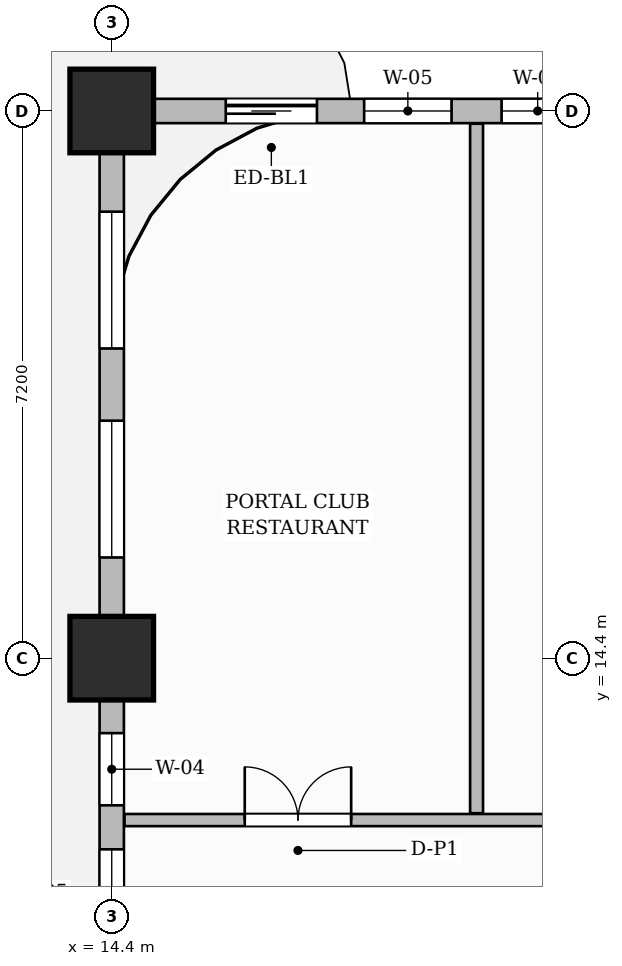
"""IFC4 building model, lengths in metres.
Left out: names, types, materials, properties, quantities, classifications, styles, units other than length and angle.
Written with IfcOpenShell. Run it as: python <this file> out.ifc"""

import sys

from ifc_helpers import new_model, si_unit, direction, frame, frame_2d, origin, origin_2d, place, context, subcontext, project, spatial, rectangle, extrude, source, transform, mapped, element, fill, save


model = new_model("IFC4")
c1 = context("Model", 3, precision=1e-05, world=origin(), true_north=direction((0.0, 1.0)))
c2 = subcontext(c1, "Body", "Model", "MODEL_VIEW")
j1 = project(units=[si_unit("LENGTHUNIT", "METRE"), si_unit("PLANEANGLEUNIT", "RADIAN")], contexts=[c1])
p1 = place(None, origin())
s1 = spatial("IfcSite", under=j1, at=p1, CompositionType="ELEMENT")
p2 = place(p1, origin())
s2 = spatial("IfcBuilding", under=s1, at=p2, CompositionType="ELEMENT")
p3 = place(p2, frame((0.0, 0.0, 54.6)))
s3 = spatial("IfcBuildingStorey", under=s2, at=p3, CompositionType="ELEMENT", Elevation=54.6)
m1 = source(origin(), c2, "Body", "SweptSolid", [
    extrude(rectangle(XDim=1.1, YDim=1.1, at=origin_2d()), origin(), (0.0, 0.0, 1.0), 3.7),
])
for number, where, z_axis, x_axis in (
    (1, (14.4, 14.4, 0.0), (0.0, 0.0, 1.0), (1.0, 0.0, 0.0)),
    (2, (14.4, 21.6, 0.0), (0.0, 0.0, 1.0), (1.0, 0.0, 0.0)),
):
    element("IfcColumn", number, at=place(p3, frame(where, z_axis=z_axis, x_axis=x_axis)), inside=s3, PredefinedType="COLUMN", context=c2, shape_type="MappedRepresentation", body=[
        mapped(m1, transform((0.0, 0.0, 0.0), scale=1.0)),
    ])
p4 = place(p3, frame((14.568, 12.27, 0.0), z_axis=(0.0, 0.0, 1.0), x_axis=(1.0, 0.0, 0.0)))
e3 = element("IfcWall", 3, at=p4, inside=s3, PredefinedType="PARTITIONING", context=c2, shape_type="SweptSolid", body=[
    extrude(rectangle(XDim=15.542, YDim=0.16, at=frame_2d((7.771, 0.0))), origin(), (0.0, 0.0, 1.0), 3.45),
])
p5 = place(p4, frame((1.582, 0.0, 0.0)))
e4 = element("IfcOpeningElement", 4, at=p5, cuts=e3, PredefinedType="OPENING", context=c2, shape_type="SweptSolid", body=[
    extrude(rectangle(XDim=1.4, YDim=2.35, at=frame_2d((0.7, 1.175))), frame((0.0, 0.09, 0.0), z_axis=(0.0, -1.0, 0.0), x_axis=(1.0, 0.0, 0.0)), (0.0, 0.0, 1.0), 0.18),
])
p6 = place(p4, frame((5.757, 0.0, 0.0)))
e5 = element("IfcOpeningElement", 5, at=p6, cuts=e3, PredefinedType="OPENING", context=c2, shape_type="SweptSolid", body=[
    extrude(rectangle(XDim=1.0, YDim=2.2, at=frame_2d((0.5, 1.1))), frame((0.0, 0.09, 0.0), z_axis=(0.0, -1.0, 0.0), x_axis=(1.0, 0.0, 0.0)), (0.0, 0.0, 1.0), 0.18),
])
p7 = place(p4, frame((13.582, 0.0, 0.0)))
e6 = element("IfcOpeningElement", 6, at=p7, cuts=e3, PredefinedType="OPENING", context=c2, shape_type="SweptSolid", body=[
    extrude(rectangle(XDim=1.05, YDim=2.25, at=frame_2d((0.525, 1.125))), frame((0.0, 0.09, 0.0), z_axis=(0.0, -1.0, 0.0), x_axis=(1.0, 0.0, 0.0)), (0.0, 0.0, 1.0), 0.18),
])
p8 = place(p3, frame((19.2, 12.36, 0.0), z_axis=(0.0, 0.0, 1.0), x_axis=(0.0, 1.0, 0.0)))
e7 = element("IfcWall", 7, at=p8, inside=s3, PredefinedType="PARTITIONING", context=c2, shape_type="SweptSolid", body=[
    extrude(rectangle(XDim=9.072, YDim=0.17, at=frame_2d((4.536, 0.0))), origin(), (0.0, 0.0, 1.0), 3.45),
])
p9 = place(p3, frame((14.4, 21.6, 0.0), z_axis=(0.0, 0.0, 1.0), x_axis=(1.0, 0.0, 0.0)))
e8 = element("IfcWall", 8, at=p9, inside=s3, PredefinedType="SOLIDWALL", context=c2, shape_type="SweptSolid", body=[
    extrude(rectangle(XDim=43.2, YDim=0.32, at=frame_2d((21.6, 0.0))), origin(), (0.0, 0.0, 1.0), 2.885),
])
p10 = place(p9, frame((1.5, 0.0, 0.0)))
e9 = element("IfcOpeningElement", 9, at=p10, cuts=e8, PredefinedType="OPENING", context=c2, shape_type="SweptSolid", body=[
    extrude(rectangle(XDim=1.2, YDim=2.2, at=frame_2d((0.6, 1.1))), frame((0.0, 0.17, 0.0), z_axis=(0.0, -1.0, 0.0), x_axis=(1.0, 0.0, 0.0)), (0.0, 0.0, 1.0), 0.34),
])
p11 = place(p9, frame((3.321, 0.0, 0.8)))
e10 = element("IfcOpeningElement", 10, at=p11, cuts=e8, PredefinedType="OPENING", context=c2, shape_type="SweptSolid", body=[
    extrude(rectangle(XDim=1.15, YDim=1.8, at=frame_2d((0.575, 0.9))), frame((0.0, 0.17, 0.0), z_axis=(0.0, -1.0, 0.0), x_axis=(1.0, 0.0, 0.0)), (0.0, 0.0, 1.0), 0.34),
])
p12 = place(p9, frame((5.129, 0.0, 0.8)))
e11 = element("IfcOpeningElement", 11, at=p12, cuts=e8, PredefinedType="OPENING", context=c2, shape_type="SweptSolid", body=[
    extrude(rectangle(XDim=0.95, YDim=1.75, at=frame_2d((0.475, 0.875))), frame((0.0, 0.17, 0.0), z_axis=(0.0, -1.0, 0.0), x_axis=(1.0, 0.0, 0.0)), (0.0, 0.0, 1.0), 0.34),
])
p13 = place(p9, frame((8.496, 0.0, 0.8)))
e12 = element("IfcOpeningElement", 12, at=p13, cuts=e8, PredefinedType="OPENING", context=c2, shape_type="SweptSolid", body=[
    extrude(rectangle(XDim=1.4, YDim=1.85, at=frame_2d((0.7, 0.925))), frame((0.0, 0.17, 0.0), z_axis=(0.0, -1.0, 0.0), x_axis=(1.0, 0.0, 0.0)), (0.0, 0.0, 1.0), 0.34),
])
p14 = place(p9, frame((11.104, 0.0, 0.8)))
e13 = element("IfcOpeningElement", 13, at=p14, cuts=e8, PredefinedType="OPENING", context=c2, shape_type="SweptSolid", body=[
    extrude(rectangle(XDim=1.8, YDim=1.85, at=frame_2d((0.9, 0.925))), frame((0.0, 0.17, 0.0), z_axis=(0.0, -1.0, 0.0), x_axis=(1.0, 0.0, 0.0)), (0.0, 0.0, 1.0), 0.34),
])
p15 = place(p9, frame((16.701, 0.0, 0.8)))
e14 = element("IfcOpeningElement", 14, at=p15, cuts=e8, PredefinedType="OPENING", context=c2, shape_type="SweptSolid", body=[
    extrude(rectangle(XDim=1.8, YDim=1.85, at=frame_2d((0.9, 0.925))), frame((0.0, 0.17, 0.0), z_axis=(0.0, -1.0, 0.0), x_axis=(1.0, 0.0, 0.0)), (0.0, 0.0, 1.0), 0.34),
])
p16 = place(p9, frame((21.725, 0.0, 0.8)))
e15 = element("IfcOpeningElement", 15, at=p16, cuts=e8, PredefinedType="OPENING", context=c2, shape_type="SweptSolid", body=[
    extrude(rectangle(XDim=1.8, YDim=1.85, at=frame_2d((0.9, 0.925))), frame((0.0, 0.17, 0.0), z_axis=(0.0, -1.0, 0.0), x_axis=(1.0, 0.0, 0.0)), (0.0, 0.0, 1.0), 0.34),
])
p17 = place(p9, frame((24.475, 0.0, 0.8)))
e16 = element("IfcOpeningElement", 16, at=p17, cuts=e8, PredefinedType="OPENING", context=c2, shape_type="SweptSolid", body=[
    extrude(rectangle(XDim=1.8, YDim=1.85, at=frame_2d((0.9, 0.925))), frame((0.0, 0.17, 0.0), z_axis=(0.0, -1.0, 0.0), x_axis=(1.0, 0.0, 0.0)), (0.0, 0.0, 1.0), 0.34),
])
p18 = place(p9, frame((29.075, 0.0, 0.8)))
e17 = element("IfcOpeningElement", 17, at=p18, cuts=e8, PredefinedType="OPENING", context=c2, shape_type="SweptSolid", body=[
    extrude(rectangle(XDim=1.8, YDim=1.85, at=frame_2d((0.9, 0.925))), frame((0.0, 0.17, 0.0), z_axis=(0.0, -1.0, 0.0), x_axis=(1.0, 0.0, 0.0)), (0.0, 0.0, 1.0), 0.34),
])
p19 = place(p9, frame((32.125, 0.0, 0.8)))
e18 = element("IfcOpeningElement", 18, at=p19, cuts=e8, PredefinedType="OPENING", context=c2, shape_type="SweptSolid", body=[
    extrude(rectangle(XDim=1.8, YDim=1.85, at=frame_2d((0.9, 0.925))), frame((0.0, 0.17, 0.0), z_axis=(0.0, -1.0, 0.0), x_axis=(1.0, 0.0, 0.0)), (0.0, 0.0, 1.0), 0.34),
])
p20 = place(p9, frame((36.875, 0.0, 0.8)))
e19 = element("IfcOpeningElement", 19, at=p20, cuts=e8, PredefinedType="OPENING", context=c2, shape_type="SweptSolid", body=[
    extrude(rectangle(XDim=1.8, YDim=1.85, at=frame_2d((0.9, 0.925))), frame((0.0, 0.17, 0.0), z_axis=(0.0, -1.0, 0.0), x_axis=(1.0, 0.0, 0.0)), (0.0, 0.0, 1.0), 0.34),
])
p21 = place(p9, frame((39.925, 0.0, 0.8)))
e20 = element("IfcOpeningElement", 20, at=p21, cuts=e8, PredefinedType="OPENING", context=c2, shape_type="SweptSolid", body=[
    extrude(rectangle(XDim=1.8, YDim=1.85, at=frame_2d((0.9, 0.925))), frame((0.0, 0.17, 0.0), z_axis=(0.0, -1.0, 0.0), x_axis=(1.0, 0.0, 0.0)), (0.0, 0.0, 1.0), 0.34),
])
p22 = place(p3, frame((14.4, 0.05, 0.0), z_axis=(0.0, 0.0, 1.0), x_axis=(0.0, 1.0, 0.0)))
e21 = element("IfcWall", 21, at=p22, inside=s3, PredefinedType="SOLIDWALL", context=c2, shape_type="SweptSolid", body=[
    extrude(rectangle(XDim=21.5, YDim=0.32, at=frame_2d((10.75, 0.0))), origin(), (0.0, 0.0, 1.0), 2.885),
])
p23 = place(p22, frame((1.275, 0.0, 0.8)))
e22 = element("IfcOpeningElement", 22, at=p23, cuts=e21, PredefinedType="OPENING", context=c2, shape_type="SweptSolid", body=[
    extrude(rectangle(XDim=1.8, YDim=1.85, at=frame_2d((0.9, 0.925))), frame((0.0, 0.17, 0.0), z_axis=(0.0, -1.0, 0.0), x_axis=(1.0, 0.0, 0.0)), (0.0, 0.0, 1.0), 0.34),
])
p24 = place(p22, frame((4.025, 0.0, 0.8)))
e23 = element("IfcOpeningElement", 23, at=p24, cuts=e21, PredefinedType="OPENING", context=c2, shape_type="SweptSolid", body=[
    extrude(rectangle(XDim=1.8, YDim=1.85, at=frame_2d((0.9, 0.925))), frame((0.0, 0.17, 0.0), z_axis=(0.0, -1.0, 0.0), x_axis=(1.0, 0.0, 0.0)), (0.0, 0.0, 1.0), 0.34),
])
p25 = place(p22, frame((8.421, 0.0, 0.8)))
e24 = element("IfcOpeningElement", 24, at=p25, cuts=e21, PredefinedType="OPENING", context=c2, shape_type="SweptSolid", body=[
    extrude(rectangle(XDim=1.4, YDim=1.85, at=frame_2d((0.7, 0.925))), frame((0.0, 0.17, 0.0), z_axis=(0.0, -1.0, 0.0), x_axis=(1.0, 0.0, 0.0)), (0.0, 0.0, 1.0), 0.34),
])
p26 = place(p22, frame((10.685, 0.0, 0.8)))
e25 = element("IfcOpeningElement", 25, at=p26, cuts=e21, PredefinedType="OPENING", context=c2, shape_type="SweptSolid", body=[
    extrude(rectangle(XDim=1.15, YDim=1.8, at=frame_2d((0.575, 0.9))), frame((0.0, 0.17, 0.0), z_axis=(0.0, -1.0, 0.0), x_axis=(1.0, 0.0, 0.0)), (0.0, 0.0, 1.0), 0.34),
])
p27 = place(p22, frame((12.414, 0.0, 0.8)))
e26 = element("IfcOpeningElement", 26, at=p27, cuts=e21, PredefinedType="OPENING", context=c2, shape_type="SweptSolid", body=[
    extrude(rectangle(XDim=0.95, YDim=1.75, at=frame_2d((0.475, 0.875))), frame((0.0, 0.17, 0.0), z_axis=(0.0, -1.0, 0.0), x_axis=(1.0, 0.0, 0.0)), (0.0, 0.0, 1.0), 0.34),
])
p28 = place(p22, frame((15.675, 0.0, 0.8)))
e27 = element("IfcOpeningElement", 27, at=p28, cuts=e21, PredefinedType="OPENING", context=c2, shape_type="SweptSolid", body=[
    extrude(rectangle(XDim=1.8, YDim=1.85, at=frame_2d((0.9, 0.925))), frame((0.0, 0.17, 0.0), z_axis=(0.0, -1.0, 0.0), x_axis=(1.0, 0.0, 0.0)), (0.0, 0.0, 1.0), 0.34),
])
p29 = place(p22, frame((18.425, 0.0, 0.8)))
e28 = element("IfcOpeningElement", 28, at=p29, cuts=e21, PredefinedType="OPENING", context=c2, shape_type="SweptSolid", body=[
    extrude(rectangle(XDim=1.8, YDim=1.85, at=frame_2d((0.9, 0.925))), frame((0.0, 0.17, 0.0), z_axis=(0.0, -1.0, 0.0), x_axis=(1.0, 0.0, 0.0)), (0.0, 0.0, 1.0), 0.34),
])
m2 = source(origin(), c2, "Body", "SweptSolid", [
    extrude(rectangle(XDim=1.4, YDim=2.35, at=frame_2d((0.7, 1.175))), frame((0.0, 0.025, 0.0), z_axis=(0.0, -1.0, 0.0), x_axis=(1.0, 0.0, 0.0)), (0.0, 0.0, 1.0), 0.05),
])
p30 = place(p5, origin())
e29 = element("IfcDoor", 29, at=p30, inside=s3, OperationType="DOUBLE_DOOR_SINGLE_SWING", PredefinedType="DOOR", context=c2, shape_type="MappedRepresentation", body=[
    mapped(m2, transform((0.0, 0.0, 0.0), scale=1.0)),
])
fill(e4, e29)
m3 = source(origin(), c2, "Body", "SweptSolid", [
    extrude(rectangle(XDim=1.2, YDim=2.2, at=frame_2d((0.6, 1.1))), frame((0.0, 0.025, 0.0), z_axis=(0.0, -1.0, 0.0), x_axis=(1.0, 0.0, 0.0)), (0.0, 0.0, 1.0), 0.05),
])
p31 = place(p10, origin())
e30 = element("IfcDoor", 30, at=p31, inside=s3, OperationType="SLIDING_TO_LEFT", PredefinedType="DOOR", context=c2, shape_type="MappedRepresentation", body=[
    mapped(m3, transform((0.0, 0.0, 0.0), scale=1.0)),
])
fill(e9, e30)
m4 = source(origin(), c2, "Body", "SweptSolid", [
    extrude(rectangle(XDim=1.15, YDim=1.8, at=frame_2d((0.575, 0.9))), frame((0.0, 0.03, 0.0), z_axis=(0.0, -1.0, 0.0), x_axis=(1.0, 0.0, 0.0)), (0.0, 0.0, 1.0), 0.06),
])
p32 = place(p11, origin())
e31 = element("IfcWindow", 31, at=p32, inside=s3, PartitioningType="SINGLE_PANEL", PredefinedType="WINDOW", context=c2, shape_type="MappedRepresentation", body=[
    mapped(m4, transform((0.0, 0.0, 0.0), scale=1.0)),
])
fill(e10, e31)
m5 = source(origin(), c2, "Body", "SweptSolid", [
    extrude(rectangle(XDim=0.95, YDim=1.75, at=frame_2d((0.475, 0.875))), frame((0.0, 0.03, 0.0), z_axis=(0.0, -1.0, 0.0), x_axis=(1.0, 0.0, 0.0)), (0.0, 0.0, 1.0), 0.06),
])
p33 = place(p12, origin())
e32 = element("IfcWindow", 32, at=p33, inside=s3, PartitioningType="SINGLE_PANEL", PredefinedType="WINDOW", context=c2, shape_type="MappedRepresentation", body=[
    mapped(m5, transform((0.0, 0.0, 0.0), scale=1.0)),
])
fill(e11, e32)
p34 = place(p26, origin())
e33 = element("IfcWindow", 33, at=p34, inside=s3, PartitioningType="SINGLE_PANEL", PredefinedType="WINDOW", context=c2, shape_type="MappedRepresentation", body=[
    mapped(m4, transform((0.0, 0.0, 0.0), scale=1.0)),
])
fill(e25, e33)
p35 = place(p27, origin())
e34 = element("IfcWindow", 34, at=p35, inside=s3, PartitioningType="SINGLE_PANEL", PredefinedType="WINDOW", context=c2, shape_type="MappedRepresentation", body=[
    mapped(m5, transform((0.0, 0.0, 0.0), scale=1.0)),
])
fill(e26, e34)
m6 = source(origin(), c2, "Body", "SweptSolid", [
    extrude(rectangle(XDim=1.8, YDim=1.85, at=frame_2d((0.9, 0.925))), frame((0.0, 0.03, 0.0), z_axis=(0.0, -1.0, 0.0), x_axis=(1.0, 0.0, 0.0)), (0.0, 0.0, 1.0), 0.06),
])
p36 = place(p28, origin())
e35 = element("IfcWindow", 35, at=p36, inside=s3, PartitioningType="DOUBLE_PANEL_VERTICAL", PredefinedType="WINDOW", context=c2, shape_type="MappedRepresentation", body=[
    mapped(m6, transform((0.0, 0.0, 0.0), scale=1.0)),
])
fill(e27, e35)
p37 = place(p29, origin())
e36 = element("IfcWindow", 36, at=p37, inside=s3, PartitioningType="DOUBLE_PANEL_VERTICAL", PredefinedType="WINDOW", context=c2, shape_type="MappedRepresentation", body=[
    mapped(m6, transform((0.0, 0.0, 0.0), scale=1.0)),
])
fill(e28, e36)
save(model, sys.argv[1])
